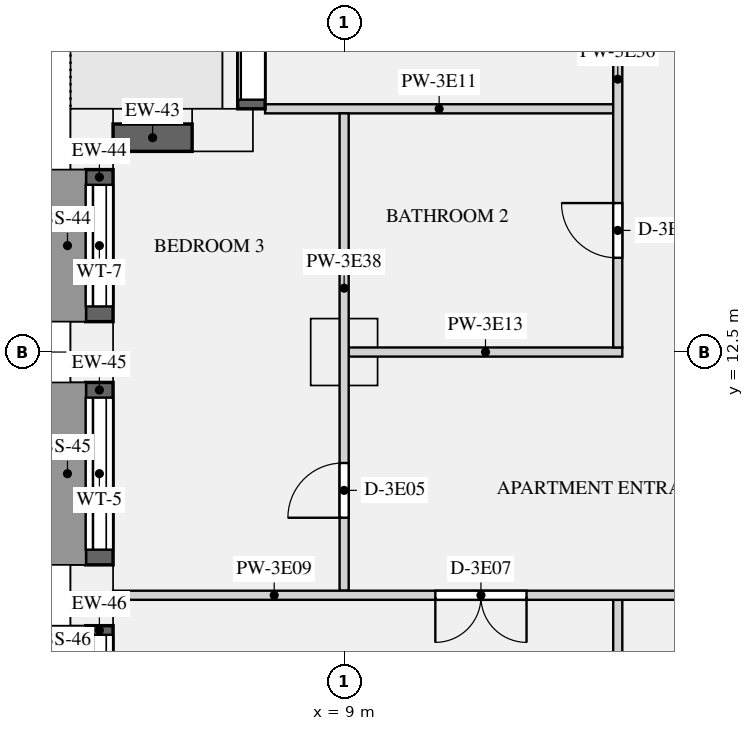
"""IFC4 building model, lengths in metres.
Left out: names, types, materials, properties, quantities, classifications, styles, units other than length and angle.
Written with IfcOpenShell. Run it as: python <this file> out.ifc"""

import sys

from ifc_helpers import new_model, si_unit, direction, frame, frame_2d, origin, origin_2d, place, context, subcontext, project, spatial, rectangle, extrude, element, fill, save


model = new_model("IFC4")
c1 = context("Model", 3, precision=1e-05, world=origin(), true_north=direction((0.0, 1.0)))
c2 = subcontext(c1, "Body", "Model", "MODEL_VIEW")
j1 = project(units=[si_unit("LENGTHUNIT", "METRE"), si_unit("PLANEANGLEUNIT", "RADIAN")], contexts=[c1])
p1 = place(None, origin())
s1 = spatial("IfcSite", under=j1, at=p1, CompositionType="ELEMENT")
p2 = place(p1, origin())
s2 = spatial("IfcBuilding", under=s1, at=p2, CompositionType="ELEMENT")
p3 = place(p2, frame((0.0, 0.0, 172.8)))
s3 = spatial("IfcBuildingStorey", under=s2, at=p3, CompositionType="ELEMENT", Elevation=172.8)
for number, where, z_axis, x_axis in (
    (1, (7.0, 16.15, 0.0), (0.0, 0.0, 1.0), (-1.0, 0.0, 0.0)),
    (2, (4.85, 16.0, 0.0), (0.0, 0.0, 1.0), (0.0, -1.0, 0.0)),
    (3, (4.85, 12.5, 0.0), (0.0, 0.0, 1.0), (0.0, -1.0, 0.0)),
    (4, (4.85, 8.5, 0.0), (0.0, 0.0, 1.0), (0.0, -1.0, 0.0)),
):
    element("IfcColumn", number, at=place(p3, frame(where, z_axis=z_axis, x_axis=x_axis)), inside=s3, PredefinedType="USERDEFINED", context=c2, shape_type="SweptSolid", body=[
        extrude(rectangle(XDim=1.0, YDim=0.7, at=origin_2d()), origin(), (0.0, 0.0, 1.0), 3.15),
    ])
p4 = place(p3, frame((9.0, 12.5, 0.0), z_axis=(0.0, 0.0, 1.0), x_axis=(1.0, 0.0, 0.0)))
e5 = element("IfcColumn", 5, at=p4, inside=s3, PredefinedType="COLUMN", context=c2, shape_type="SweptSolid", body=[
    extrude(rectangle(XDim=1.1, YDim=1.1, at=origin_2d()), origin(), (0.0, 0.0, 1.0), 3.15),
])
p5 = place(p3, frame((7.475, 20.0, 0.0), z_axis=(0.0, 0.0, 1.0), x_axis=(0.0, -1.0, 0.0)))
e6 = element("IfcWall", 6, at=p5, inside=s3, PredefinedType="SOLIDWALL", context=c2, shape_type="SweptSolid", body=[
    extrude(rectangle(XDim=3.5, YDim=0.45, at=frame_2d((1.75, 0.0))), origin(), (0.0, 0.0, 1.0), 2.83),
])
p6 = place(p5, frame((0.15, 0.0, 0.0)))
e7 = element("IfcOpeningElement", 7, at=p6, cuts=e6, PredefinedType="OPENING", context=c2, shape_type="SweptSolid", body=[
    extrude(rectangle(XDim=3.2, YDim=2.3, at=frame_2d((1.6, 1.15))), frame((0.0, 0.235, 0.0), z_axis=(0.0, -1.0, 0.0), x_axis=(1.0, 0.0, 0.0)), (0.0, 0.0, 1.0), 0.47),
])
p7 = place(p3, frame((6.5, 16.025, 0.9), z_axis=(0.0, 0.0, 1.0), x_axis=(-1.0, 0.0, 0.0)))
e8 = element("IfcWall", 8, at=p7, inside=s3, PredefinedType="SOLIDWALL", context=c2, shape_type="SweptSolid", body=[
    extrude(rectangle(XDim=1.3, YDim=0.45, at=frame_2d((0.65, 0.0))), origin(), (0.0, 0.0, 1.0), 1.93),
])
p8 = place(p3, frame((4.975, 15.5, 0.9), z_axis=(0.0, 0.0, 1.0), x_axis=(0.0, -1.0, 0.0)))
e9 = element("IfcWall", 9, at=p8, inside=s3, PredefinedType="SOLIDWALL", context=c2, shape_type="SweptSolid", body=[
    extrude(rectangle(XDim=2.5, YDim=0.45, at=frame_2d((1.25, 0.0))), origin(), (0.0, 0.0, 1.0), 1.93),
])
p9 = place(p8, frame((0.25, 0.0, 0.15)))
e10 = element("IfcOpeningElement", 10, at=p9, cuts=e9, PredefinedType="OPENING", context=c2, shape_type="SweptSolid", body=[
    extrude(rectangle(XDim=2.0, YDim=1.5, at=frame_2d((1.0, 0.75))), frame((0.0, 0.235, 0.0), z_axis=(0.0, -1.0, 0.0), x_axis=(1.0, 0.0, 0.0)), (0.0, 0.0, 1.0), 0.47),
])
p10 = place(p3, frame((4.975, 12.0, 0.9), z_axis=(0.0, 0.0, 1.0), x_axis=(0.0, -1.0, 0.0)))
e11 = element("IfcWall", 11, at=p10, inside=s3, PredefinedType="SOLIDWALL", context=c2, shape_type="SweptSolid", body=[
    extrude(rectangle(XDim=3.0, YDim=0.45, at=frame_2d((1.5, 0.0))), origin(), (0.0, 0.0, 1.0), 1.93),
])
p11 = place(p10, frame((0.25, 0.0, 0.15)))
e12 = element("IfcOpeningElement", 12, at=p11, cuts=e11, PredefinedType="OPENING", context=c2, shape_type="SweptSolid", body=[
    extrude(rectangle(XDim=2.5, YDim=1.5, at=frame_2d((1.25, 0.75))), frame((0.0, 0.235, 0.0), z_axis=(0.0, -1.0, 0.0), x_axis=(1.0, 0.0, 0.0)), (0.0, 0.0, 1.0), 0.47),
])
p12 = place(p3, frame((4.975, 8.0, 0.9), z_axis=(0.0, 0.0, 1.0), x_axis=(0.0, -1.0, 0.0)))
e13 = element("IfcWall", 13, at=p12, inside=s3, PredefinedType="SOLIDWALL", context=c2, shape_type="SweptSolid", body=[
    extrude(rectangle(XDim=2.8, YDim=0.45, at=frame_2d((1.4, 0.0))), origin(), (0.0, 0.0, 1.0), 1.93),
])
p13 = place(p12, frame((0.15, 0.0, 0.15)))
e14 = element("IfcOpeningElement", 14, at=p13, cuts=e13, PredefinedType="OPENING", context=c2, shape_type="SweptSolid", body=[
    extrude(rectangle(XDim=2.5, YDim=1.5, at=frame_2d((1.25, 0.75))), frame((0.0, 0.235, 0.0), z_axis=(0.0, -1.0, 0.0), x_axis=(1.0, 0.0, 0.0)), (0.0, 0.0, 1.0), 0.47),
])
p14 = place(p3, frame((5.2, 8.5, 0.0), z_axis=(0.0, 0.0, 1.0), x_axis=(1.0, 0.0, 0.0)))
e15 = element("IfcWall", 15, at=p14, inside=s3, PredefinedType="PARTITIONING", context=c2, shape_type="SweptSolid", body=[
    extrude(rectangle(XDim=12.8, YDim=0.15, at=frame_2d((6.4, 0.0))), origin(), (0.0, 0.0, 1.0), 2.83),
])
p15 = place(p14, frame((10.1, 0.0, 0.0)))
e16 = element("IfcOpeningElement", 16, at=p15, cuts=e15, PredefinedType="OPENING", context=c2, shape_type="SweptSolid", body=[
    extrude(rectangle(XDim=0.9, YDim=2.1, at=frame_2d((0.45, 1.05))), frame((0.0, 0.085, 0.0), z_axis=(0.0, -1.0, 0.0), x_axis=(1.0, 0.0, 0.0)), (0.0, 0.0, 1.0), 0.17),
])
p16 = place(p14, frame((5.3, 0.0, 0.0)))
e17 = element("IfcOpeningElement", 17, at=p16, cuts=e15, PredefinedType="OPENING", context=c2, shape_type="SweptSolid", body=[
    extrude(rectangle(XDim=1.5, YDim=2.1, at=frame_2d((0.75, 1.05))), frame((0.0, 0.085, 0.0), z_axis=(0.0, -1.0, 0.0), x_axis=(1.0, 0.0, 0.0)), (0.0, 0.0, 1.0), 0.17),
])
p17 = place(p3, frame((7.7, 16.5, 0.0), z_axis=(0.0, 0.0, 1.0), x_axis=(1.0, 0.0, 0.0)))
e18 = element("IfcWall", 18, at=p17, inside=s3, PredefinedType="PARTITIONING", context=c2, shape_type="SweptSolid", body=[
    extrude(rectangle(XDim=5.725, YDim=0.15, at=frame_2d((2.863, 0.0))), origin(), (0.0, 0.0, 1.0), 2.83),
])
p18 = place(p3, frame((9.075, 12.5, 0.0), z_axis=(0.0, 0.0, 1.0), x_axis=(1.0, 0.0, 0.0)))
e19 = element("IfcWall", 19, at=p18, inside=s3, PredefinedType="PARTITIONING", context=c2, shape_type="SweptSolid", body=[
    extrude(rectangle(XDim=4.5, YDim=0.15, at=frame_2d((2.25, 0.0))), origin(), (0.0, 0.0, 1.0), 2.83),
])
p19 = place(p3, frame((13.5, 0.7, 0.0), z_axis=(0.0, 0.0, 1.0), x_axis=(0.0, 1.0, 0.0)))
e20 = element("IfcWall", 20, at=p19, inside=s3, PredefinedType="PARTITIONING", context=c2, shape_type="SweptSolid", body=[
    extrude(rectangle(XDim=7.725, YDim=0.15, at=frame_2d((3.863, 0.0))), origin(), (0.0, 0.0, 1.0), 2.83),
])
p20 = place(p3, frame((13.5, 12.575, 0.0), z_axis=(0.0, 0.0, 1.0), x_axis=(0.0, 1.0, 0.0)))
e21 = element("IfcWall", 21, at=p20, inside=s3, PredefinedType="PARTITIONING", context=c2, shape_type="SweptSolid", body=[
    extrude(rectangle(XDim=10.325, YDim=0.15, at=frame_2d((5.163, 0.0))), origin(), (0.0, 0.0, 1.0), 2.83),
])
p21 = place(p20, frame((1.475, 0.0, 0.0)))
e22 = element("IfcOpeningElement", 22, at=p21, cuts=e21, PredefinedType="OPENING", context=c2, shape_type="SweptSolid", body=[
    extrude(rectangle(XDim=0.9, YDim=2.1, at=frame_2d((0.45, 1.05))), frame((0.0, 0.085, 0.0), z_axis=(0.0, -1.0, 0.0), x_axis=(1.0, 0.0, 0.0)), (0.0, 0.0, 1.0), 0.17),
])
p22 = place(p20, frame((6.45, 0.0, 0.0)))
e23 = element("IfcOpeningElement", 23, at=p22, cuts=e21, PredefinedType="OPENING", context=c2, shape_type="SweptSolid", body=[
    extrude(rectangle(XDim=1.5, YDim=2.1, at=frame_2d((0.75, 1.05))), frame((0.0, 0.085, 0.0), z_axis=(0.0, -1.0, 0.0), x_axis=(1.0, 0.0, 0.0)), (0.0, 0.0, 1.0), 0.17),
])
p23 = place(p3, frame((9.0, 8.575, 0.0), z_axis=(0.0, 0.0, 1.0), x_axis=(0.0, 1.0, 0.0)))
e24 = element("IfcWall", 24, at=p23, inside=s3, PredefinedType="PARTITIONING", context=c2, shape_type="SweptSolid", body=[
    extrude(rectangle(XDim=7.85, YDim=0.15, at=frame_2d((3.925, 0.0))), origin(), (0.0, 0.0, 1.0), 2.83),
])
p24 = place(p23, frame((1.2, 0.0, 0.0)))
e25 = element("IfcOpeningElement", 25, at=p24, cuts=e24, PredefinedType="OPENING", context=c2, shape_type="SweptSolid", body=[
    extrude(rectangle(XDim=0.9, YDim=2.1, at=frame_2d((0.45, 1.05))), frame((0.0, 0.085, 0.0), z_axis=(0.0, -1.0, 0.0), x_axis=(1.0, 0.0, 0.0)), (0.0, 0.0, 1.0), 0.17),
])
p25 = place(p6, origin())
e26 = element("IfcDoor", 26, at=p25, inside=s3, OperationType="SLIDING_TO_LEFT", PredefinedType="DOOR", context=c2, shape_type="SweptSolid", body=[
    extrude(rectangle(XDim=3.2, YDim=2.3, at=frame_2d((1.6, 1.15))), frame((0.0, -0.07, 0.0), z_axis=(0.0, -1.0, 0.0), x_axis=(1.0, 0.0, 0.0)), (0.0, 0.0, 1.0), 0.05),
])
fill(e7, e26)
p26 = place(p9, origin())
e27 = element("IfcWindow", 27, at=p26, inside=s3, PartitioningType="SINGLE_PANEL", PredefinedType="WINDOW", context=c2, shape_type="SweptSolid", body=[
    extrude(rectangle(XDim=2.0, YDim=1.5, at=frame_2d((1.0, 0.75))), frame((0.0, -0.065, 0.0), z_axis=(0.0, -1.0, 0.0), x_axis=(1.0, 0.0, 0.0)), (0.0, 0.0, 1.0), 0.06),
])
fill(e10, e27)
p27 = place(p11, origin())
e28 = element("IfcWindow", 28, at=p27, inside=s3, PartitioningType="SINGLE_PANEL", PredefinedType="WINDOW", context=c2, shape_type="SweptSolid", body=[
    extrude(rectangle(XDim=2.5, YDim=1.5, at=frame_2d((1.25, 0.75))), frame((0.0, -0.065, 0.0), z_axis=(0.0, -1.0, 0.0), x_axis=(1.0, 0.0, 0.0)), (0.0, 0.0, 1.0), 0.06),
])
fill(e12, e28)
p28 = place(p13, origin())
e29 = element("IfcWindow", 29, at=p28, inside=s3, PartitioningType="SINGLE_PANEL", PredefinedType="WINDOW", context=c2, shape_type="SweptSolid", body=[
    extrude(rectangle(XDim=2.5, YDim=1.5, at=frame_2d((1.25, 0.75))), frame((0.0, -0.065, 0.0), z_axis=(0.0, -1.0, 0.0), x_axis=(1.0, 0.0, 0.0)), (0.0, 0.0, 1.0), 0.06),
])
fill(e14, e29)
p29 = place(p24, origin())
e30 = element("IfcDoor", 30, at=p29, inside=s3, OperationType="SINGLE_SWING_LEFT", PredefinedType="DOOR", context=c2, shape_type="SweptSolid", body=[
    extrude(rectangle(XDim=0.9, YDim=2.1, at=frame_2d((0.45, 1.05))), frame((0.0, 0.025, 0.0), z_axis=(0.0, -1.0, 0.0), x_axis=(1.0, 0.0, 0.0)), (0.0, 0.0, 1.0), 0.05),
])
fill(e25, e30)
p30 = place(p21, origin())
e31 = element("IfcDoor", 31, at=p30, inside=s3, OperationType="SINGLE_SWING_RIGHT", PredefinedType="DOOR", context=c2, shape_type="SweptSolid", body=[
    extrude(rectangle(XDim=0.9, YDim=2.1, at=frame_2d((0.45, 1.05))), frame((0.0, 0.025, 0.0), z_axis=(0.0, -1.0, 0.0), x_axis=(1.0, 0.0, 0.0)), (0.0, 0.0, 1.0), 0.05),
])
fill(e22, e31)
p31 = place(p16, frame((1.5, 0.0, 0.0), z_axis=(0.0, 0.0, 1.0), x_axis=(-1.0, 0.0, 0.0)))
e32 = element("IfcDoor", 32, at=p31, inside=s3, OperationType="DOUBLE_DOOR_SINGLE_SWING", PredefinedType="DOOR", context=c2, shape_type="SweptSolid", body=[
    extrude(rectangle(XDim=1.5, YDim=2.1, at=frame_2d((0.75, 1.05))), frame((0.0, 0.025, 0.0), z_axis=(0.0, -1.0, 0.0), x_axis=(1.0, 0.0, 0.0)), (0.0, 0.0, 1.0), 0.05),
])
fill(e17, e32)
save(model, sys.argv[1])
